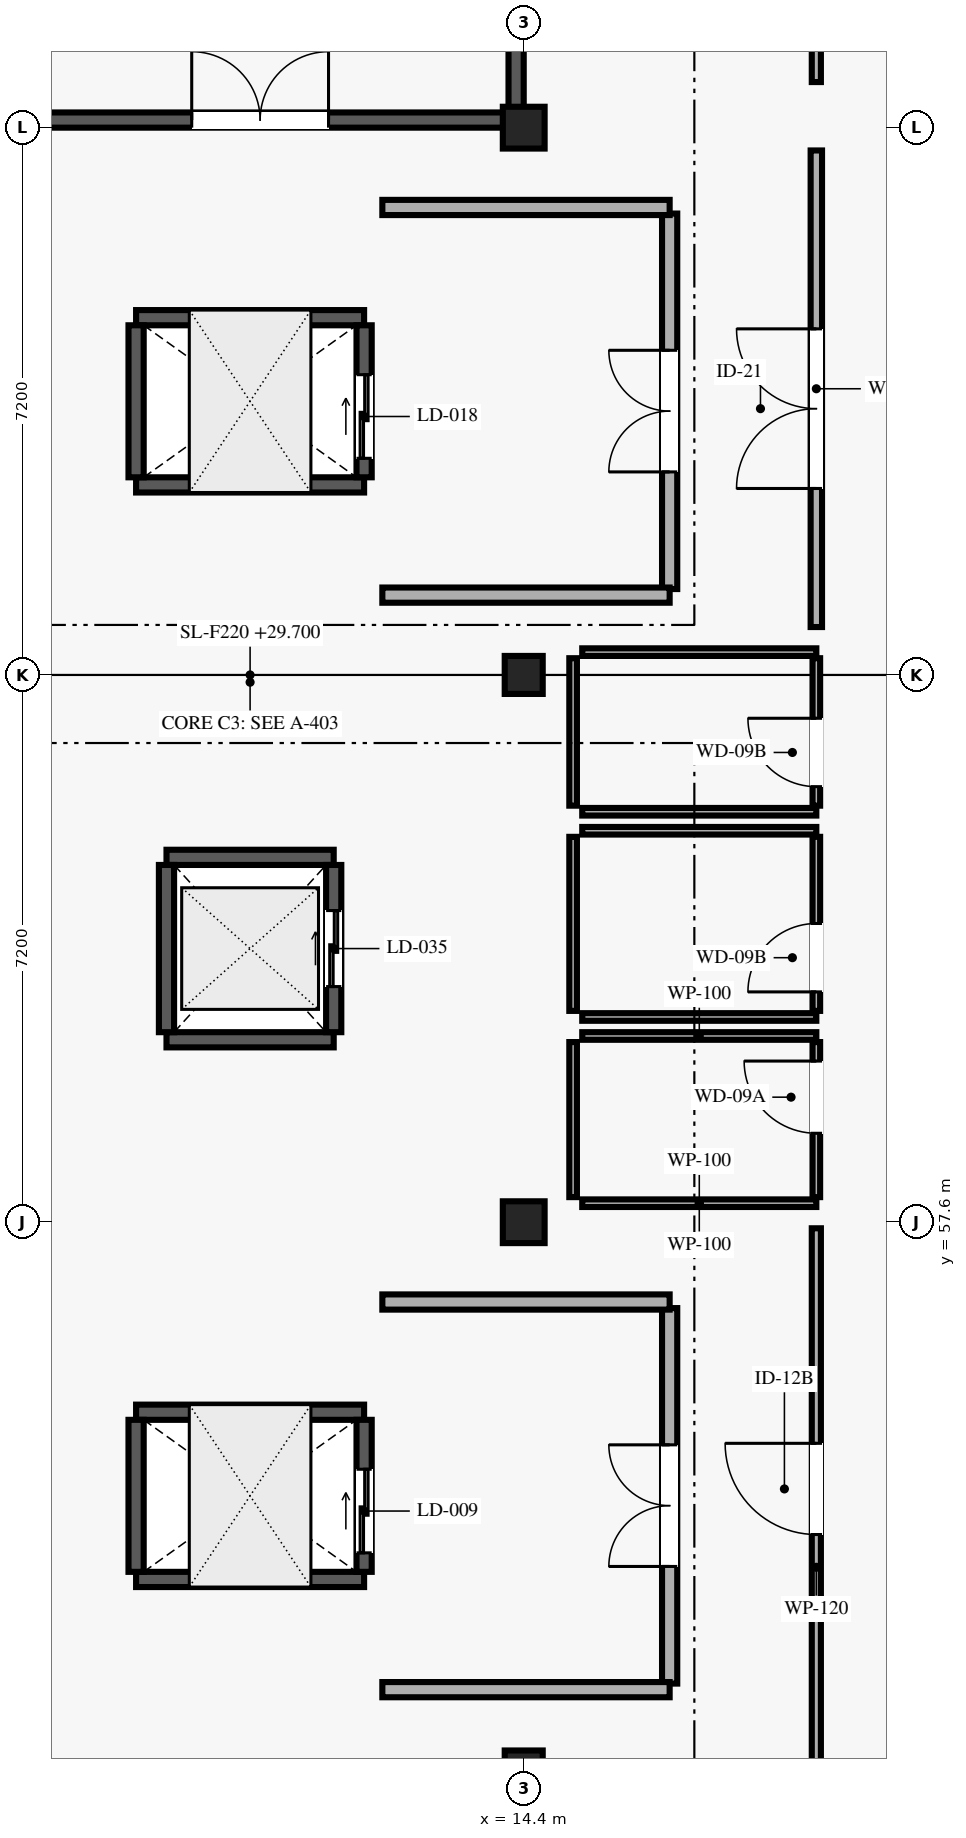
"""IFC4 building model, lengths in metres.
Left out: names, types, materials, properties, quantities, classifications, styles, units other than length and angle.
Written with IfcOpenShell. Run it as: python <this file> out.ifc"""

import sys

from ifc_helpers import new_model, si_unit, direction, frame, frame_2d, origin, origin_2d, place, context, subcontext, project, spatial, rectangle, extrude, element, fill, save


model = new_model("IFC4")
c1 = context("Model", 3, precision=1e-05, world=origin(), true_north=direction((0.0, 1.0)))
c2 = subcontext(c1, "Body", "Model", "MODEL_VIEW")
j1 = project(units=[si_unit("LENGTHUNIT", "METRE"), si_unit("PLANEANGLEUNIT", "RADIAN")], contexts=[c1])
p1 = place(None, origin())
s1 = spatial("IfcSite", under=j1, at=p1, CompositionType="ELEMENT")
p2 = place(p1, origin())
s2 = spatial("IfcBuilding", under=s1, at=p2, CompositionType="ELEMENT")
p3 = place(p2, frame((0.0, 0.0, 29.7)))
s3 = spatial("IfcBuildingStorey", under=s2, at=p3, CompositionType="ELEMENT", Elevation=29.7)
p4 = place(p3, frame((14.4, 50.4, 0.0), z_axis=(0.0, 0.0, 1.0), x_axis=(1.0, 0.0, 0.0)))
e1 = element("IfcColumn", 1, at=p4, inside=s3, PredefinedType="COLUMN", context=c2, shape_type="SweptSolid", body=[
    extrude(rectangle(XDim=0.5, YDim=0.5, at=origin_2d()), origin(), (0.0, 0.0, 1.0), 4.05),
])
p5 = place(p3, frame((14.4, 57.6, 0.0), z_axis=(0.0, 0.0, 1.0), x_axis=(1.0, 0.0, 0.0)))
e2 = element("IfcColumn", 2, at=p5, inside=s3, PredefinedType="COLUMN", context=c2, shape_type="SweptSolid", body=[
    extrude(rectangle(XDim=0.55, YDim=0.55, at=origin_2d()), origin(), (0.0, 0.0, 1.0), 4.05),
])
p6 = place(p3, frame((14.4, 64.8, 0.0), z_axis=(0.0, 0.0, 1.0), x_axis=(1.0, 0.0, 0.0)))
e3 = element("IfcColumn", 3, at=p6, inside=s3, PredefinedType="COLUMN", context=c2, shape_type="SweptSolid", body=[
    extrude(rectangle(XDim=0.5, YDim=0.5, at=origin_2d()), origin(), (0.0, 0.0, 1.0), 4.05),
])
p7 = place(p3, frame((14.4, 72.0, 0.0), z_axis=(0.0, 0.0, 1.0), x_axis=(1.0, 0.0, 0.0)))
e4 = element("IfcColumn", 4, at=p7, inside=s3, PredefinedType="COLUMN", context=c2, shape_type="SweptSolid", body=[
    extrude(rectangle(XDim=0.55, YDim=0.55, at=origin_2d()), origin(), (0.0, 0.0, 1.0), 4.05),
])
p8 = place(p3, frame((7.4, 72.1, 0.0), z_axis=(0.0, 0.0, 1.0), x_axis=(1.0, 0.0, 0.0)))
e5 = element("IfcWall", 5, at=p8, inside=s3, PredefinedType="SHEAR", context=c2, shape_type="SweptSolid", body=[
    extrude(rectangle(XDim=6.8, YDim=0.2, at=frame_2d((3.4, 0.0))), origin(), (0.0, 0.0, 1.0), 3.83),
])
p9 = place(p8, frame((2.632, 0.0, 0.0)))
e6 = element("IfcOpeningElement", 6, at=p9, cuts=e5, PredefinedType="OPENING", context=c2, shape_type="SweptSolid", body=[
    extrude(rectangle(XDim=1.8, YDim=2.2, at=frame_2d((0.9, 1.1))), frame((0.0, 0.11, 0.0), z_axis=(0.0, -1.0, 0.0), x_axis=(1.0, 0.0, 0.0)), (0.0, 0.0, 1.0), 0.22),
])
p10 = place(p3, frame((14.3, 72.2, 0.0), z_axis=(0.0, 0.0, 1.0), x_axis=(0.0, 1.0, 0.0)))
e7 = element("IfcWall", 7, at=p10, inside=s3, PredefinedType="SHEAR", context=c2, shape_type="SweptSolid", body=[
    extrude(rectangle(XDim=6.8, YDim=0.2, at=frame_2d((3.4, 0.0))), origin(), (0.0, 0.0, 1.0), 3.83),
])
for number, where, z_axis, x_axis in (
    (8, (9.3, 52.9, 0.0), (0.0, 0.0, 1.0), (1.0, 0.0, 0.0)),
    (9, (9.3, 55.1, 0.0), (0.0, 0.0, 1.0), (1.0, 0.0, 0.0)),
):
    element("IfcWall", number, at=place(p3, frame(where, z_axis=z_axis, x_axis=x_axis)), inside=s3, PredefinedType="SHEAR", context=c2, shape_type="SweptSolid", body=[
        extrude(rectangle(XDim=3.0, YDim=0.2, at=frame_2d((1.5, 0.0))), origin(), (0.0, 0.0, 1.0), 3.83),
    ])
p11 = place(p3, frame((9.3, 53.0, 0.0), z_axis=(0.0, 0.0, 1.0), x_axis=(0.0, 1.0, 0.0)))
e10 = element("IfcWall", 10, at=p11, inside=s3, PredefinedType="SHEAR", context=c2, shape_type="SweptSolid", body=[
    extrude(rectangle(XDim=2.0, YDim=0.2, at=frame_2d((1.0, 0.0))), origin(), (0.0, 0.0, 1.0), 3.83),
])
p12 = place(p3, frame((12.3, 53.0, 0.0), z_axis=(0.0, 0.0, 1.0), x_axis=(0.0, 1.0, 0.0)))
e11 = element("IfcWall", 11, at=p12, inside=s3, PredefinedType="SHEAR", context=c2, shape_type="SweptSolid", body=[
    extrude(rectangle(XDim=2.0, YDim=0.2, at=frame_2d((1.0, 0.0))), origin(), (0.0, 0.0, 1.0), 3.83),
])
p13 = place(p12, frame((0.25, 0.0, 0.0)))
e12 = element("IfcOpeningElement", 12, at=p13, cuts=e11, PredefinedType="OPENING", context=c2, shape_type="SweptSolid", body=[
    extrude(rectangle(XDim=1.1, YDim=2.15, at=frame_2d((0.55, 1.075))), frame((0.0, 0.11, 0.0), z_axis=(0.0, -1.0, 0.0), x_axis=(1.0, 0.0, 0.0)), (0.0, 0.0, 1.0), 0.22),
])
for number, where, z_axis, x_axis in (
    (13, (9.3, 67.3, 0.0), (0.0, 0.0, 1.0), (1.0, 0.0, 0.0)),
    (14, (9.3, 69.5, 0.0), (0.0, 0.0, 1.0), (1.0, 0.0, 0.0)),
):
    element("IfcWall", number, at=place(p3, frame(where, z_axis=z_axis, x_axis=x_axis)), inside=s3, PredefinedType="SHEAR", context=c2, shape_type="SweptSolid", body=[
        extrude(rectangle(XDim=3.0, YDim=0.2, at=frame_2d((1.5, 0.0))), origin(), (0.0, 0.0, 1.0), 3.83),
    ])
p14 = place(p3, frame((9.3, 67.4, 0.0), z_axis=(0.0, 0.0, 1.0), x_axis=(0.0, 1.0, 0.0)))
e15 = element("IfcWall", 15, at=p14, inside=s3, PredefinedType="SHEAR", context=c2, shape_type="SweptSolid", body=[
    extrude(rectangle(XDim=2.0, YDim=0.2, at=frame_2d((1.0, 0.0))), origin(), (0.0, 0.0, 1.0), 3.83),
])
p15 = place(p3, frame((12.3, 67.4, 0.0), z_axis=(0.0, 0.0, 1.0), x_axis=(0.0, 1.0, 0.0)))
e16 = element("IfcWall", 16, at=p15, inside=s3, PredefinedType="SHEAR", context=c2, shape_type="SweptSolid", body=[
    extrude(rectangle(XDim=2.0, YDim=0.2, at=frame_2d((1.0, 0.0))), origin(), (0.0, 0.0, 1.0), 3.83),
])
p16 = place(p15, frame((0.25, 0.0, 0.0)))
e17 = element("IfcOpeningElement", 17, at=p16, cuts=e16, PredefinedType="OPENING", context=c2, shape_type="SweptSolid", body=[
    extrude(rectangle(XDim=1.1, YDim=2.15, at=frame_2d((0.55, 1.075))), frame((0.0, 0.11, 0.0), z_axis=(0.0, -1.0, 0.0), x_axis=(1.0, 0.0, 0.0)), (0.0, 0.0, 1.0), 0.22),
])
for number, where, z_axis, x_axis in (
    (18, (9.7, 60.0, 0.0), (0.0, 0.0, 1.0), (1.0, 0.0, 0.0)),
    (19, (9.7, 62.4, 0.0), (0.0, 0.0, 1.0), (1.0, 0.0, 0.0)),
    (20, (9.7, 60.1, 0.0), (0.0, 0.0, 1.0), (0.0, 1.0, 0.0)),
):
    element("IfcWall", number, at=place(p3, frame(where, z_axis=z_axis, x_axis=x_axis)), inside=s3, PredefinedType="SHEAR", context=c2, shape_type="SweptSolid", body=[
        extrude(rectangle(XDim=2.2, YDim=0.2, at=frame_2d((1.1, 0.0))), origin(), (0.0, 0.0, 1.0), 3.83),
    ])
p17 = place(p3, frame((11.9, 60.1, 0.0), z_axis=(0.0, 0.0, 1.0), x_axis=(0.0, 1.0, 0.0)))
e21 = element("IfcWall", 21, at=p17, inside=s3, PredefinedType="SHEAR", context=c2, shape_type="SweptSolid", body=[
    extrude(rectangle(XDim=2.2, YDim=0.2, at=frame_2d((1.1, 0.0))), origin(), (0.0, 0.0, 1.0), 3.83),
])
p18 = place(p17, frame((0.6, 0.0, 0.0)))
e22 = element("IfcOpeningElement", 22, at=p18, cuts=e21, PredefinedType="OPENING", context=c2, shape_type="SweptSolid", body=[
    extrude(rectangle(XDim=1.0, YDim=2.1, at=frame_2d((0.5, 1.05))), frame((0.0, 0.11, 0.0), z_axis=(0.0, -1.0, 0.0), x_axis=(1.0, 0.0, 0.0)), (0.0, 0.0, 1.0), 0.22),
])
p19 = place(p3, frame((16.32, 51.53, 0.0), z_axis=(0.0, 0.0, 1.0), x_axis=(0.0, 1.0, 0.0)))
e23 = element("IfcWall", 23, at=p19, inside=s3, PredefinedType="SOLIDWALL", context=c2, shape_type="SweptSolid", body=[
    extrude(rectangle(XDim=4.94, YDim=0.2, at=frame_2d((2.47, 0.0))), origin(), (0.0, 0.0, 1.0), 3.83),
])
p20 = place(p19, frame((1.541, 0.0, 0.0)))
e24 = element("IfcOpeningElement", 24, at=p20, cuts=e23, PredefinedType="OPENING", context=c2, shape_type="SweptSolid", body=[
    extrude(rectangle(XDim=1.6, YDim=2.2, at=frame_2d((0.8, 1.1))), frame((0.0, 0.11, 0.0), z_axis=(0.0, -1.0, 0.0), x_axis=(1.0, 0.0, 0.0)), (0.0, 0.0, 1.0), 0.22),
])
for number, where, z_axis, x_axis in (
    (25, (12.54, 51.45, 0.0), (0.0, 0.0, 1.0), (1.0, 0.0, 0.0)),
    (26, (12.54, 56.55, 0.0), (0.0, 0.0, 1.0), (1.0, 0.0, 0.0)),
):
    element("IfcWall", number, at=place(p3, frame(where, z_axis=z_axis, x_axis=x_axis)), inside=s3, PredefinedType="SOLIDWALL", context=c2, shape_type="SweptSolid", body=[
        extrude(rectangle(XDim=3.78, YDim=0.2, at=frame_2d((1.89, 0.0))), origin(), (0.0, 0.0, 1.0), 3.83),
    ])
p21 = place(p3, frame((16.32, 65.93, 0.0), z_axis=(0.0, 0.0, 1.0), x_axis=(0.0, 1.0, 0.0)))
e27 = element("IfcWall", 27, at=p21, inside=s3, PredefinedType="SOLIDWALL", context=c2, shape_type="SweptSolid", body=[
    extrude(rectangle(XDim=4.94, YDim=0.2, at=frame_2d((2.47, 0.0))), origin(), (0.0, 0.0, 1.0), 3.83),
])
p22 = place(p21, frame((1.541, 0.0, 0.0)))
e28 = element("IfcOpeningElement", 28, at=p22, cuts=e27, PredefinedType="OPENING", context=c2, shape_type="SweptSolid", body=[
    extrude(rectangle(XDim=1.6, YDim=2.2, at=frame_2d((0.8, 1.1))), frame((0.0, 0.11, 0.0), z_axis=(0.0, -1.0, 0.0), x_axis=(1.0, 0.0, 0.0)), (0.0, 0.0, 1.0), 0.22),
])
for number, where, z_axis, x_axis in (
    (29, (12.54, 65.85, 0.0), (0.0, 0.0, 1.0), (1.0, 0.0, 0.0)),
    (30, (12.54, 70.95, 0.0), (0.0, 0.0, 1.0), (1.0, 0.0, 0.0)),
):
    element("IfcWall", number, at=place(p3, frame(where, z_axis=z_axis, x_axis=x_axis)), inside=s3, PredefinedType="SOLIDWALL", context=c2, shape_type="SweptSolid", body=[
        extrude(rectangle(XDim=3.78, YDim=0.2, at=frame_2d((1.89, 0.0))), origin(), (0.0, 0.0, 1.0), 3.83),
    ])
p23 = place(p3, frame((18.25, 57.93, 0.0), z_axis=(0.0, 0.0, 1.0), x_axis=(0.0, 1.0, 0.0)))
e31 = element("IfcWall", 31, at=p23, inside=s3, PredefinedType="PARTITIONING", context=c2, shape_type="SweptSolid", body=[
    extrude(rectangle(XDim=2.04, YDim=0.1, at=frame_2d((1.02, 0.0))), origin(), (0.0, 0.0, 1.0), 3.83),
])
p24 = place(p23, frame((0.84, 0.0, 0.0)))
e32 = element("IfcOpeningElement", 32, at=p24, cuts=e31, PredefinedType="OPENING", context=c2, shape_type="SweptSolid", body=[
    extrude(rectangle(XDim=0.95, YDim=2.1, at=frame_2d((0.475, 1.05))), frame((0.0, 0.06, 0.0), z_axis=(0.0, -1.0, 0.0), x_axis=(1.0, 0.0, 0.0)), (0.0, 0.0, 1.0), 0.12),
])
p25 = place(p3, frame((15.17, 57.85, 0.0), z_axis=(0.0, 0.0, 1.0), x_axis=(1.0, 0.0, 0.0)))
e33 = element("IfcWall", 33, at=p25, inside=s3, PredefinedType="PARTITIONING", context=c2, shape_type="SweptSolid", body=[
    extrude(rectangle(XDim=3.08, YDim=0.1, at=frame_2d((1.54, 0.0))), origin(), (0.0, 0.0, 1.0), 3.32),
])
p26 = place(p3, frame((15.17, 60.05, 0.0), z_axis=(0.0, 0.0, 1.0), x_axis=(1.0, 0.0, 0.0)))
e34 = element("IfcWall", 34, at=p26, inside=s3, PredefinedType="PARTITIONING", context=c2, shape_type="SweptSolid", body=[
    extrude(rectangle(XDim=3.08, YDim=0.1, at=frame_2d((1.54, 0.0))), origin(), (0.0, 0.0, 1.0), 3.83),
])
p27 = place(p3, frame((15.05, 57.93, 0.0), z_axis=(0.0, 0.0, 1.0), x_axis=(0.0, 1.0, 0.0)))
e35 = element("IfcWall", 35, at=p27, inside=s3, PredefinedType="PARTITIONING", context=c2, shape_type="SweptSolid", body=[
    extrude(rectangle(XDim=2.04, YDim=0.1, at=frame_2d((1.02, 0.0))), origin(), (0.0, 0.0, 1.0), 3.83),
])
p28 = place(p3, frame((18.25, 60.38, 0.0), z_axis=(0.0, 0.0, 1.0), x_axis=(0.0, 1.0, 0.0)))
e36 = element("IfcWall", 36, at=p28, inside=s3, PredefinedType="PARTITIONING", context=c2, shape_type="SweptSolid", body=[
    extrude(rectangle(XDim=2.29, YDim=0.1, at=frame_2d((1.145, 0.0))), origin(), (0.0, 0.0, 1.0), 3.83),
])
p29 = place(p28, frame((0.25, 0.0, 0.0)))
e37 = element("IfcOpeningElement", 37, at=p29, cuts=e36, PredefinedType="OPENING", context=c2, shape_type="SweptSolid", body=[
    extrude(rectangle(XDim=0.9, YDim=2.1, at=frame_2d((0.45, 1.05))), frame((0.0, 0.06, 0.0), z_axis=(0.0, -1.0, 0.0), x_axis=(1.0, 0.0, 0.0)), (0.0, 0.0, 1.0), 0.12),
])
for number, where, z_axis, x_axis in (
    (38, (15.17, 60.3, 0.0), (0.0, 0.0, 1.0), (1.0, 0.0, 0.0)),
    (39, (15.17, 62.75, 0.0), (0.0, 0.0, 1.0), (1.0, 0.0, 0.0)),
):
    element("IfcWall", number, at=place(p3, frame(where, z_axis=z_axis, x_axis=x_axis)), inside=s3, PredefinedType="PARTITIONING", context=c2, shape_type="SweptSolid", body=[
        extrude(rectangle(XDim=3.08, YDim=0.1, at=frame_2d((1.54, 0.0))), origin(), (0.0, 0.0, 1.0), 3.83),
    ])
p30 = place(p3, frame((15.05, 60.38, 0.0), z_axis=(0.0, 0.0, 1.0), x_axis=(0.0, 1.0, 0.0)))
e40 = element("IfcWall", 40, at=p30, inside=s3, PredefinedType="PARTITIONING", context=c2, shape_type="SweptSolid", body=[
    extrude(rectangle(XDim=2.29, YDim=0.1, at=frame_2d((1.145, 0.0))), origin(), (0.0, 0.0, 1.0), 3.83),
])
p31 = place(p3, frame((18.25, 63.08, 0.0), z_axis=(0.0, 0.0, 1.0), x_axis=(0.0, 1.0, 0.0)))
e41 = element("IfcWall", 41, at=p31, inside=s3, PredefinedType="PARTITIONING", context=c2, shape_type="SweptSolid", body=[
    extrude(rectangle(XDim=1.94, YDim=0.1, at=frame_2d((0.97, 0.0))), origin(), (0.0, 0.0, 1.0), 3.83),
])
p32 = place(p31, frame((0.25, 0.0, 0.0)))
e42 = element("IfcOpeningElement", 42, at=p32, cuts=e41, PredefinedType="OPENING", context=c2, shape_type="SweptSolid", body=[
    extrude(rectangle(XDim=0.9, YDim=2.1, at=frame_2d((0.45, 1.05))), frame((0.0, 0.06, 0.0), z_axis=(0.0, -1.0, 0.0), x_axis=(1.0, 0.0, 0.0)), (0.0, 0.0, 1.0), 0.12),
])
p33 = place(p3, frame((15.17, 63.0, 0.0), z_axis=(0.0, 0.0, 1.0), x_axis=(1.0, 0.0, 0.0)))
e43 = element("IfcWall", 43, at=p33, inside=s3, PredefinedType="PARTITIONING", context=c2, shape_type="SweptSolid", body=[
    extrude(rectangle(XDim=3.08, YDim=0.1, at=frame_2d((1.54, 0.0))), origin(), (0.0, 0.0, 1.0), 3.83),
])
p34 = place(p3, frame((15.17, 65.1, 0.0), z_axis=(0.0, 0.0, 1.0), x_axis=(1.0, 0.0, 0.0)))
e44 = element("IfcWall", 44, at=p34, inside=s3, PredefinedType="PARTITIONING", context=c2, shape_type="SweptSolid", body=[
    extrude(rectangle(XDim=3.08, YDim=0.1, at=frame_2d((1.54, 0.0))), origin(), (0.0, 0.0, 1.0), 3.37),
])
p35 = place(p3, frame((15.05, 63.08, 0.0), z_axis=(0.0, 0.0, 1.0), x_axis=(0.0, 1.0, 0.0)))
e45 = element("IfcWall", 45, at=p35, inside=s3, PredefinedType="PARTITIONING", context=c2, shape_type="SweptSolid", body=[
    extrude(rectangle(XDim=1.94, YDim=0.1, at=frame_2d((0.97, 0.0))), origin(), (0.0, 0.0, 1.0), 3.83),
])
p36 = place(p3, frame((18.25, 48.6, 0.0), z_axis=(0.0, 0.0, 1.0), x_axis=(0.0, 1.0, 0.0)))
e46 = element("IfcWall", 46, at=p36, inside=s3, PredefinedType="PARTITIONING", context=c2, shape_type="SweptSolid", body=[
    extrude(rectangle(XDim=8.92, YDim=0.12, at=frame_2d((4.46, 0.0))), origin(), (0.0, 0.0, 1.0), 3.83),
])
p37 = place(p36, frame((4.891, 0.0, 0.0)))
e47 = element("IfcOpeningElement", 47, at=p37, cuts=e46, PredefinedType="OPENING", context=c2, shape_type="SweptSolid", body=[
    extrude(rectangle(XDim=1.2, YDim=2.15, at=frame_2d((0.6, 1.075))), frame((0.0, 0.07, 0.0), z_axis=(0.0, -1.0, 0.0), x_axis=(1.0, 0.0, 0.0)), (0.0, 0.0, 1.0), 0.14),
])
p38 = place(p3, frame((18.25, 65.43, 0.0), z_axis=(0.0, 0.0, 1.0), x_axis=(0.0, 1.0, 0.0)))
e48 = element("IfcWall", 48, at=p38, inside=s3, PredefinedType="PARTITIONING", context=c2, shape_type="SweptSolid", body=[
    extrude(rectangle(XDim=6.27, YDim=0.15, at=frame_2d((3.135, 0.0))), origin(), (0.0, 0.0, 1.0), 3.83),
])
p39 = place(p38, frame((1.823, 0.0, 0.0)))
e49 = element("IfcOpeningElement", 49, at=p39, cuts=e48, PredefinedType="OPENING", context=c2, shape_type="SweptSolid", body=[
    extrude(rectangle(XDim=2.1, YDim=2.4, at=frame_2d((1.05, 1.2))), frame((0.0, 0.085, 0.0), z_axis=(0.0, -1.0, 0.0), x_axis=(1.0, 0.0, 0.0)), (0.0, 0.0, 1.0), 0.17),
])
p40 = place(p3, frame((18.25, 72.6, 0.0), z_axis=(0.0, 0.0, 1.0), x_axis=(0.0, 1.0, 0.0)))
e50 = element("IfcWall", 50, at=p40, inside=s3, PredefinedType="PARTITIONING", context=c2, shape_type="SweptSolid", body=[
    extrude(rectangle(XDim=9.9, YDim=0.12, at=frame_2d((4.95, 0.0))), origin(), (0.0, 0.0, 1.0), 3.83),
])
p41 = place(p40, frame((2.541, 0.0, 0.0)))
e51 = element("IfcOpeningElement", 51, at=p41, cuts=e50, PredefinedType="OPENING", context=c2, shape_type="SweptSolid", body=[
    extrude(rectangle(XDim=1.0, YDim=2.1, at=frame_2d((0.5, 1.05))), frame((0.0, 0.07, 0.0), z_axis=(0.0, -1.0, 0.0), x_axis=(1.0, 0.0, 0.0)), (0.0, 0.0, 1.0), 0.14),
])
p42 = place(p9, origin())
e52 = element("IfcDoor", 52, at=p42, inside=s3, OperationType="DOUBLE_DOOR_SINGLE_SWING", PredefinedType="DOOR", context=c2, shape_type="SweptSolid", body=[
    extrude(rectangle(XDim=1.8, YDim=2.2, at=frame_2d((0.9, 1.1))), frame((0.0, 0.025, 0.0), z_axis=(0.0, -1.0, 0.0), x_axis=(1.0, 0.0, 0.0)), (0.0, 0.0, 1.0), 0.05),
])
fill(e6, e52)
p43 = place(p13, origin())
e53 = element("IfcDoor", 53, at=p43, inside=s3, OperationType="DOUBLE_DOOR_SLIDING", PredefinedType="DOOR", context=c2, shape_type="SweptSolid", body=[
    extrude(rectangle(XDim=1.1, YDim=2.15, at=frame_2d((0.55, 1.075))), frame((0.0, 0.025, 0.0), z_axis=(0.0, -1.0, 0.0), x_axis=(1.0, 0.0, 0.0)), (0.0, 0.0, 1.0), 0.05),
])
fill(e12, e53)
p44 = place(p16, origin())
e54 = element("IfcDoor", 54, at=p44, inside=s3, OperationType="DOUBLE_DOOR_SLIDING", PredefinedType="DOOR", context=c2, shape_type="SweptSolid", body=[
    extrude(rectangle(XDim=1.1, YDim=2.15, at=frame_2d((0.55, 1.075))), frame((0.0, 0.025, 0.0), z_axis=(0.0, -1.0, 0.0), x_axis=(1.0, 0.0, 0.0)), (0.0, 0.0, 1.0), 0.05),
])
fill(e17, e54)
p45 = place(p18, origin())
e55 = element("IfcDoor", 55, at=p45, inside=s3, OperationType="DOUBLE_DOOR_SLIDING", PredefinedType="DOOR", context=c2, shape_type="SweptSolid", body=[
    extrude(rectangle(XDim=1.0, YDim=2.1, at=frame_2d((0.5, 1.05))), frame((0.0, 0.025, 0.0), z_axis=(0.0, -1.0, 0.0), x_axis=(1.0, 0.0, 0.0)), (0.0, 0.0, 1.0), 0.05),
])
fill(e22, e55)
p46 = place(p20, origin())
e56 = element("IfcDoor", 56, at=p46, inside=s3, OperationType="DOUBLE_DOOR_SINGLE_SWING", PredefinedType="DOOR", context=c2, shape_type="SweptSolid", body=[
    extrude(rectangle(XDim=1.6, YDim=2.2, at=frame_2d((0.8, 1.1))), frame((0.0, 0.025, 0.0), z_axis=(0.0, -1.0, 0.0), x_axis=(1.0, 0.0, 0.0)), (0.0, 0.0, 1.0), 0.05),
])
fill(e24, e56)
p47 = place(p22, origin())
e57 = element("IfcDoor", 57, at=p47, inside=s3, OperationType="DOUBLE_DOOR_SINGLE_SWING", PredefinedType="DOOR", context=c2, shape_type="SweptSolid", body=[
    extrude(rectangle(XDim=1.6, YDim=2.2, at=frame_2d((0.8, 1.1))), frame((0.0, 0.025, 0.0), z_axis=(0.0, -1.0, 0.0), x_axis=(1.0, 0.0, 0.0)), (0.0, 0.0, 1.0), 0.05),
])
fill(e28, e57)
p48 = place(p24, origin())
e58 = element("IfcDoor", 58, at=p48, inside=s3, OperationType="SINGLE_SWING_RIGHT", PredefinedType="DOOR", context=c2, shape_type="SweptSolid", body=[
    extrude(rectangle(XDim=0.95, YDim=2.1, at=frame_2d((0.475, 1.05))), frame((0.0, 0.025, 0.0), z_axis=(0.0, -1.0, 0.0), x_axis=(1.0, 0.0, 0.0)), (0.0, 0.0, 1.0), 0.05),
])
fill(e32, e58)
p49 = place(p29, origin())
e59 = element("IfcDoor", 59, at=p49, inside=s3, OperationType="SINGLE_SWING_LEFT", PredefinedType="DOOR", context=c2, shape_type="SweptSolid", body=[
    extrude(rectangle(XDim=0.9, YDim=2.1, at=frame_2d((0.45, 1.05))), frame((0.0, 0.025, 0.0), z_axis=(0.0, -1.0, 0.0), x_axis=(1.0, 0.0, 0.0)), (0.0, 0.0, 1.0), 0.05),
])
fill(e37, e59)
p50 = place(p32, origin())
e60 = element("IfcDoor", 60, at=p50, inside=s3, OperationType="SINGLE_SWING_RIGHT", PredefinedType="DOOR", context=c2, shape_type="SweptSolid", body=[
    extrude(rectangle(XDim=0.9, YDim=2.1, at=frame_2d((0.45, 1.05))), frame((0.0, 0.025, 0.0), z_axis=(0.0, -1.0, 0.0), x_axis=(1.0, 0.0, 0.0)), (0.0, 0.0, 1.0), 0.05),
])
fill(e42, e60)
p51 = place(p37, origin())
e61 = element("IfcDoor", 61, at=p51, inside=s3, OperationType="SINGLE_SWING_RIGHT", PredefinedType="DOOR", context=c2, shape_type="SweptSolid", body=[
    extrude(rectangle(XDim=1.2, YDim=2.15, at=frame_2d((0.6, 1.075))), frame((0.0, 0.025, 0.0), z_axis=(0.0, -1.0, 0.0), x_axis=(1.0, 0.0, 0.0)), (0.0, 0.0, 1.0), 0.05),
])
fill(e47, e61)
p52 = place(p39, origin())
e62 = element("IfcDoor", 62, at=p52, inside=s3, OperationType="DOUBLE_DOOR_SINGLE_SWING", PredefinedType="DOOR", context=c2, shape_type="SweptSolid", body=[
    extrude(rectangle(XDim=2.1, YDim=2.4, at=frame_2d((1.05, 1.2))), frame((0.0, 0.025, 0.0), z_axis=(0.0, -1.0, 0.0), x_axis=(1.0, 0.0, 0.0)), (0.0, 0.0, 1.0), 0.05),
])
fill(e49, e62)
save(model, sys.argv[1])
